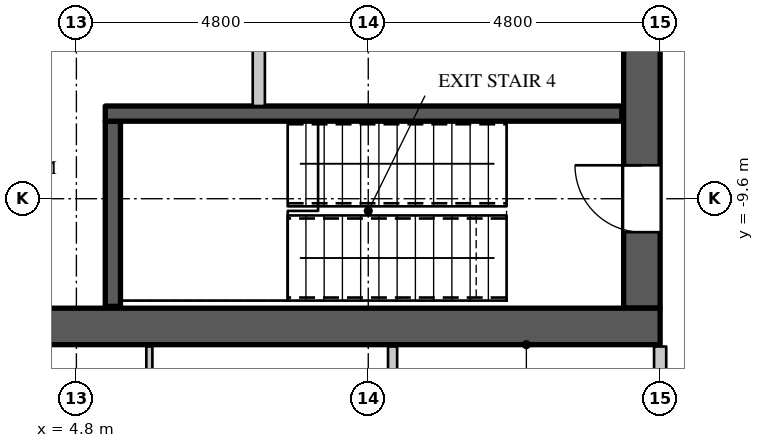
"""IFC4 building model, lengths in metres.
Left out: names, types, materials, properties, quantities, classifications, styles, units other than length and angle.
Written with IfcOpenShell. Run it as: python <this file> out.ifc"""

import sys

from ifc_helpers import new_model, si_unit, direction, frame, frame_2d, origin, place, context, subcontext, project, spatial, rectangle, extrude, element, fill, save


model = new_model("IFC4")
c1 = context("Model", 3, precision=1e-05, world=origin(), true_north=direction((0.0, 1.0)))
c2 = subcontext(c1, "Body", "Model", "MODEL_VIEW")
j1 = project(units=[si_unit("LENGTHUNIT", "METRE"), si_unit("PLANEANGLEUNIT", "RADIAN")], contexts=[c1])
p1 = place(None, origin())
s1 = spatial("IfcSite", under=j1, at=p1, CompositionType="ELEMENT")
p2 = place(p1, origin())
s2 = spatial("IfcBuilding", under=s1, at=p2, CompositionType="ELEMENT")
p3 = place(p2, frame((0.0, 0.0, 247.5)))
s3 = spatial("IfcBuildingStorey", under=s2, at=p3, CompositionType="ELEMENT", Elevation=247.5)
p4 = place(p3, frame((-14.4, -11.7, 0.0), z_axis=(0.0, 0.0, 1.0), x_axis=(1.0, 0.0, 0.0)))
e1 = element("IfcWall", 1, at=p4, inside=s3, PredefinedType="SHEAR", context=c2, shape_type="SweptSolid", body=[
    extrude(rectangle(XDim=28.8, YDim=0.6, at=frame_2d((14.4, 0.0))), origin(), (0.0, 0.0, 1.0), 4.2),
])
p5 = place(p3, frame((14.1, -11.4, 0.0), z_axis=(0.0, 0.0, 1.0), x_axis=(0.0, 1.0, 0.0)))
e2 = element("IfcWall", 2, at=p5, inside=s3, PredefinedType="SHEAR", context=c2, shape_type="SweptSolid", body=[
    extrude(rectangle(XDim=22.8, YDim=0.6, at=frame_2d((11.4, 0.0))), origin(), (0.0, 0.0, 1.0), 4.2),
])
p6 = place(p5, frame((20.45, 0.0, 0.0)))
e3 = element("IfcOpeningElement", 3, at=p6, cuts=e2, PredefinedType="OPENING", context=c2, shape_type="SweptSolid", body=[
    extrude(rectangle(XDim=1.1, YDim=2.2, at=frame_2d((0.55, 1.1))), frame((0.0, 0.31, 0.0), z_axis=(0.0, -1.0, 0.0), x_axis=(1.0, 0.0, 0.0)), (0.0, 0.0, 1.0), 0.62),
])
p7 = place(p5, frame((1.25, 0.0, 0.0)))
e4 = element("IfcOpeningElement", 4, at=p7, cuts=e2, PredefinedType="OPENING", context=c2, shape_type="SweptSolid", body=[
    extrude(rectangle(XDim=1.1, YDim=2.2, at=frame_2d((0.55, 1.1))), frame((0.0, 0.31, 0.0), z_axis=(0.0, -1.0, 0.0), x_axis=(1.0, 0.0, 0.0)), (0.0, 0.0, 1.0), 0.62),
])
p8 = place(p5, frame((14.95, 0.0, 0.0)))
e5 = element("IfcOpeningElement", 5, at=p8, cuts=e2, PredefinedType="OPENING", context=c2, shape_type="SweptSolid", body=[
    extrude(rectangle(XDim=1.5, YDim=2.4, at=frame_2d((0.75, 1.2))), frame((0.0, 0.31, 0.0), z_axis=(0.0, -1.0, 0.0), x_axis=(1.0, 0.0, 0.0)), (0.0, 0.0, 1.0), 0.62),
])
p9 = place(p5, frame((6.35, 0.0, 0.0)))
e6 = element("IfcOpeningElement", 6, at=p9, cuts=e2, PredefinedType="OPENING", context=c2, shape_type="SweptSolid", body=[
    extrude(rectangle(XDim=1.5, YDim=2.4, at=frame_2d((0.75, 1.2))), frame((0.0, 0.31, 0.0), z_axis=(0.0, -1.0, 0.0), x_axis=(1.0, 0.0, 0.0)), (0.0, 0.0, 1.0), 0.62),
])
p10 = place(p3, frame((14.4, -14.3, 0.0), z_axis=(0.0, 0.0, 1.0), x_axis=(0.0, 1.0, 0.0)))
e7 = element("IfcWall", 7, at=p10, inside=s3, PredefinedType="PARTITIONING", context=c2, shape_type="SweptSolid", body=[
    extrude(rectangle(XDim=2.27, YDim=0.2, at=frame_2d((1.135, 0.0))), origin(), (0.0, 0.0, 1.0), 3.95),
])
p11 = place(p3, frame((10.0, -18.075, 0.0), z_axis=(0.0, 0.0, 1.0), x_axis=(0.0, 1.0, 0.0)))
e8 = element("IfcWall", 8, at=p11, inside=s3, PredefinedType="PARTITIONING", context=c2, shape_type="SweptSolid", body=[
    extrude(rectangle(XDim=6.045, YDim=0.15, at=frame_2d((3.022, 0.0))), origin(), (0.0, 0.0, 1.0), 3.95),
])
p12 = place(p11, frame((2.55, 0.0, 0.0)))
e9 = element("IfcOpeningElement", 9, at=p12, cuts=e8, PredefinedType="OPENING", context=c2, shape_type="SweptSolid", body=[
    extrude(rectangle(XDim=0.9, YDim=2.2, at=frame_2d((0.45, 1.1))), frame((0.0, 0.085, 0.0), z_axis=(0.0, -1.0, 0.0), x_axis=(1.0, 0.0, 0.0)), (0.0, 0.0, 1.0), 0.17),
])
p13 = place(p3, frame((7.8, -8.075, 0.0), z_axis=(0.0, 0.0, 1.0), x_axis=(0.0, 1.0, 0.0)))
e10 = element("IfcWall", 10, at=p13, inside=s3, PredefinedType="PARTITIONING", context=c2, shape_type="SweptSolid", body=[
    extrude(rectangle(XDim=2.175, YDim=0.2, at=frame_2d((1.087, 0.0))), origin(), (0.0, 0.0, 1.0), 3.95),
])
p14 = place(p3, frame((5.4, -11.37, 0.0), z_axis=(0.0, 0.0, 1.0), x_axis=(0.0, 1.0, 0.0)))
e11 = element("IfcWall", 11, at=p14, inside=s3, PredefinedType="SHEAR", context=c2, shape_type="SweptSolid", body=[
    extrude(rectangle(XDim=3.045, YDim=0.25, at=frame_2d((1.522, 0.0))), origin(), (0.0, 0.0, 1.0), 3.95),
])
p15 = place(p3, frame((5.275, -8.2, 0.0), z_axis=(0.0, 0.0, 1.0), x_axis=(1.0, 0.0, 0.0)))
e12 = element("IfcWall", 12, at=p15, inside=s3, PredefinedType="SHEAR", context=c2, shape_type="SweptSolid", body=[
    extrude(rectangle(XDim=8.495, YDim=0.25, at=frame_2d((4.248, 0.0))), origin(), (0.0, 0.0, 1.0), 3.95),
])
p16 = place(p3, frame((6.0, -19.025, 0.0), z_axis=(0.0, 0.0, 1.0), x_axis=(0.0, 1.0, 0.0)))
e13 = element("IfcWall", 13, at=p16, inside=s3, PredefinedType="PARTITIONING", context=c2, shape_type="SweptSolid", body=[
    extrude(rectangle(XDim=6.995, YDim=0.1, at=frame_2d((3.498, 0.0))), origin(), (0.0, 0.0, 1.0), 3.95),
])
p17 = place(p7, origin())
e14 = element("IfcDoor", 14, at=p17, inside=s3, OperationType="SINGLE_SWING_RIGHT", PredefinedType="DOOR", context=c2, shape_type="SweptSolid", body=[
    extrude(rectangle(XDim=1.1, YDim=2.2, at=frame_2d((0.55, 1.1))), frame((0.0, 0.295, 0.0), z_axis=(0.0, -1.0, 0.0), x_axis=(1.0, 0.0, 0.0)), (0.0, 0.0, 1.0), 0.05),
])
fill(e4, e14)
save(model, sys.argv[1])
